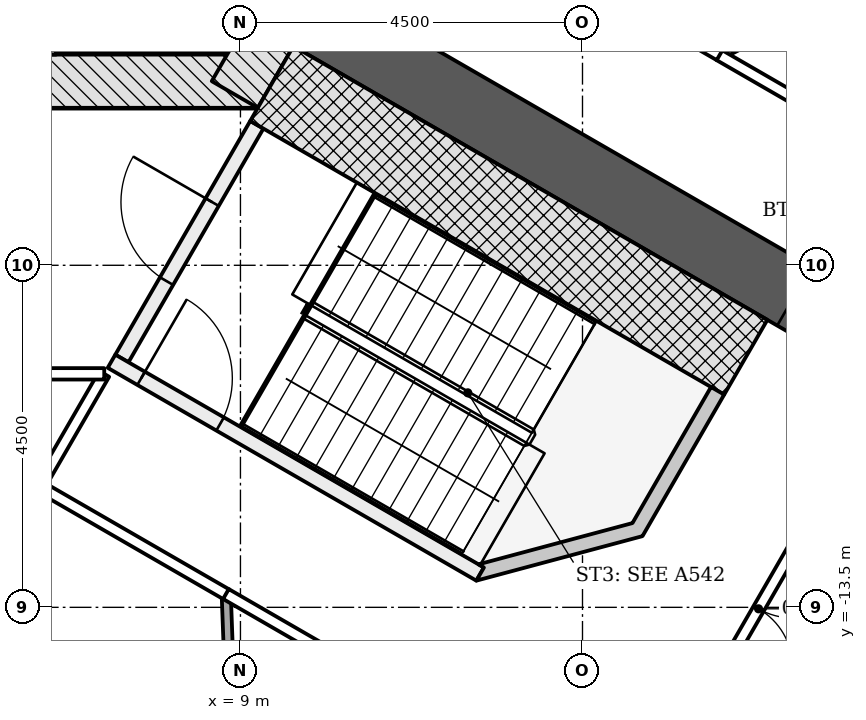
"""IFC4 building model, lengths in metres.
Left out: names, types, materials, properties, quantities, classifications, styles, units other than length and angle.
Written with IfcOpenShell. Run it as: python <this file> out.ifc"""

import sys

from ifc_helpers import new_model, si_unit, direction, frame, frame_2d, origin, place, context, subcontext, project, spatial, polyline, rectangle, outline, extrude, element, fill, save


model = new_model("IFC4")
c1 = context("Model", 3, precision=1e-05, world=origin(), true_north=direction((0.0, 1.0)))
c2 = subcontext(c1, "Body", "Model", "MODEL_VIEW")
j1 = project(units=[si_unit("LENGTHUNIT", "METRE"), si_unit("PLANEANGLEUNIT", "RADIAN")], contexts=[c1])
p1 = place(None, origin())
s1 = spatial("IfcSite", under=j1, at=p1, CompositionType="ELEMENT")
p2 = place(p1, origin())
s2 = spatial("IfcBuilding", under=s1, at=p2, CompositionType="ELEMENT")
p3 = place(p2, frame((0.0, 0.0, 19.5)))
s3 = spatial("IfcBuildingStorey", under=s2, at=p3, CompositionType="ELEMENT", Elevation=19.5)
p4 = place(p3, frame((-9.229, -6.578, -0.25), z_axis=(0.0, 0.0, 1.0), x_axis=(1.0, 0.0, 0.0)))
e1 = element("IfcWall", 1, at=p4, inside=s3, PredefinedType="SHEAR", context=c2, shape_type="SweptSolid", body=[
    extrude(rectangle(XDim=18.458, YDim=0.7, at=frame_2d((9.229, 0.0))), origin(), (0.0, 0.0, 1.0), 4.55),
])
p5 = place(p4, frame((3.304, 0.0, 0.25)))
e2 = element("IfcOpeningElement", 2, at=p5, cuts=e1, PredefinedType="OPENING", context=c2, shape_type="SweptSolid", body=[
    extrude(rectangle(XDim=1.1, YDim=2.1, at=frame_2d((0.55, 1.05))), frame((0.0, 0.36, 0.0), z_axis=(0.0, -1.0, 0.0), x_axis=(1.0, 0.0, 0.0)), (0.0, 0.0, 1.0), 0.72),
])
p6 = place(p4, frame((5.454, 0.0, 0.25)))
e3 = element("IfcOpeningElement", 3, at=p6, cuts=e1, PredefinedType="OPENING", context=c2, shape_type="SweptSolid", body=[
    extrude(rectangle(XDim=1.1, YDim=2.1, at=frame_2d((0.55, 1.05))), frame((0.0, 0.36, 0.0), z_axis=(0.0, -1.0, 0.0), x_axis=(1.0, 0.0, 0.0)), (0.0, 0.0, 1.0), 0.72),
])
p7 = place(p4, frame((7.604, 0.0, 0.25)))
e4 = element("IfcOpeningElement", 4, at=p7, cuts=e1, PredefinedType="OPENING", context=c2, shape_type="SweptSolid", body=[
    extrude(rectangle(XDim=1.1, YDim=2.1, at=frame_2d((0.55, 1.05))), frame((0.0, 0.36, 0.0), z_axis=(0.0, -1.0, 0.0), x_axis=(1.0, 0.0, 0.0)), (0.0, 0.0, 1.0), 0.72),
])
p8 = place(p4, frame((9.754, 0.0, 0.25)))
e5 = element("IfcOpeningElement", 5, at=p8, cuts=e1, PredefinedType="OPENING", context=c2, shape_type="SweptSolid", body=[
    extrude(rectangle(XDim=1.1, YDim=2.1, at=frame_2d((0.55, 1.05))), frame((0.0, 0.36, 0.0), z_axis=(0.0, -1.0, 0.0), x_axis=(1.0, 0.0, 0.0)), (0.0, 0.0, 1.0), 0.72),
])
p9 = place(p4, frame((11.904, 0.0, 0.25)))
e6 = element("IfcOpeningElement", 6, at=p9, cuts=e1, PredefinedType="OPENING", context=c2, shape_type="SweptSolid", body=[
    extrude(rectangle(XDim=1.1, YDim=2.1, at=frame_2d((0.55, 1.05))), frame((0.0, 0.36, 0.0), z_axis=(0.0, -1.0, 0.0), x_axis=(1.0, 0.0, 0.0)), (0.0, 0.0, 1.0), 0.72),
])
p10 = place(p4, frame((14.054, 0.0, 0.25)))
e7 = element("IfcOpeningElement", 7, at=p10, cuts=e1, PredefinedType="OPENING", context=c2, shape_type="SweptSolid", body=[
    extrude(rectangle(XDim=1.1, YDim=2.1, at=frame_2d((0.55, 1.05))), frame((0.0, 0.36, 0.0), z_axis=(0.0, -1.0, 0.0), x_axis=(1.0, 0.0, 0.0)), (0.0, 0.0, 1.0), 0.72),
])
p11 = place(p4, frame((1.079, 0.0, 0.25)))
e8 = element("IfcOpeningElement", 8, at=p11, cuts=e1, PredefinedType="OPENING", context=c2, shape_type="SweptSolid", body=[
    extrude(rectangle(XDim=0.9, YDim=2.1, at=frame_2d((0.45, 1.05))), frame((0.0, 0.36, 0.0), z_axis=(0.0, -1.0, 0.0), x_axis=(1.0, 0.0, 0.0)), (0.0, 0.0, 1.0), 0.72),
])
p12 = place(p3, frame((8.926, -6.753, -0.25), z_axis=(0.0, 0.0, 1.0), x_axis=(0.500042739161, 0.866000726912, 0.0)))
e9 = element("IfcWall", 9, at=p12, inside=s3, PredefinedType="SHEAR", context=c2, shape_type="SweptSolid", body=[
    extrude(rectangle(XDim=2.771, YDim=0.7, at=frame_2d((1.386, 0.0))), origin(), (0.0, 0.0, 1.0), 4.55),
])
p13 = place(p3, frame((9.922, -5.728, -0.25), z_axis=(0.0, 0.0, 1.0), x_axis=(0.866028046028, -0.499995423472, 0.0)))
e10 = element("IfcWall", 10, at=p13, inside=s3, PredefinedType="SHEAR", context=c2, shape_type="SweptSolid", body=[
    extrude(rectangle(XDim=14.633, YDim=0.9, at=frame_2d((7.316, 0.0))), origin(), (0.0, 0.0, 1.0), 4.55),
])
p14 = place(p13, frame((7.35, 0.0, 0.25)))
e11 = element("IfcOpeningElement", 11, at=p14, cuts=e10, PredefinedType="OPENING", context=c2, shape_type="SweptSolid", body=[
    extrude(rectangle(XDim=1.5, YDim=2.1, at=frame_2d((0.75, 1.05))), frame((0.0, 0.46, 0.0), z_axis=(0.0, -1.0, 0.0), x_axis=(1.0, 0.0, 0.0)), (0.0, 0.0, 1.0), 0.92),
])
p15 = place(p3, frame((6.45, -6.228, -0.25), z_axis=(0.0, 0.0, 1.0), x_axis=(0.0, 1.0, 0.0)))
e12 = element("IfcWall", 12, at=p15, inside=s3, PredefinedType="PARTITIONING", context=c2, shape_type="SweptSolid", body=[
    extrude(rectangle(XDim=2.5, YDim=0.25, at=frame_2d((1.25, 0.0))), origin(), (0.0, 0.0, 1.0), 4.55),
])
p16 = place(p3, frame((7.44, -10.226, -0.25), z_axis=(0.0, 0.0, 1.0), x_axis=(0.500022077904, 0.866012656725, 0.0)))
e13 = element("IfcWall", 13, at=p16, inside=s3, PredefinedType="SHEAR", context=c2, shape_type="SweptSolid", body=[
    extrude(rectangle(XDim=3.55, YDim=0.2, at=frame_2d((1.775, 0.0))), origin(), (0.0, 0.0, 1.0), 4.55),
])
p17 = place(p16, frame((1.175, 0.0, 0.25)))
e14 = element("IfcOpeningElement", 14, at=p17, cuts=e13, PredefinedType="OPENING", context=c2, shape_type="SweptSolid", body=[
    extrude(rectangle(XDim=1.2, YDim=2.1, at=frame_2d((0.6, 1.05))), frame((0.0, 0.11, 0.0), z_axis=(0.0, -1.0, 0.0), x_axis=(1.0, 0.0, 0.0)), (0.0, 0.0, 1.0), 0.22),
])
p18 = place(p3, frame((7.304, -10.262, -0.25), z_axis=(0.0, 0.0, 1.0), x_axis=(0.866026594901, -0.49999793692, 0.0)))
e15 = element("IfcWall", 15, at=p18, inside=s3, PredefinedType="SHEAR", context=c2, shape_type="SweptSolid", body=[
    extrude(rectangle(XDim=5.6, YDim=0.2, at=frame_2d((2.8, 0.0))), origin(), (0.0, 0.0, 1.0), 4.55),
])
p19 = place(p18, frame((0.45, 0.0, 0.25)))
e16 = element("IfcOpeningElement", 16, at=p19, cuts=e15, PredefinedType="OPENING", context=c2, shape_type="SweptSolid", body=[
    extrude(rectangle(XDim=1.2, YDim=2.1, at=frame_2d((0.6, 1.05))), frame((0.0, 0.11, 0.0), z_axis=(0.0, -1.0, 0.0), x_axis=(1.0, 0.0, 0.0)), (0.0, 0.0, 1.0), 0.22),
])
p20 = place(p3, frame((9.413, -6.61, -0.25), z_axis=(0.0, 0.0, 1.0), x_axis=(0.866018442252, -0.500012057535, 0.0)))
e17 = element("IfcWall", 17, at=p20, inside=s3, PredefinedType="SHEAR", context=c2, shape_type="SweptSolid", body=[
    extrude(rectangle(XDim=7.2, YDim=1.136, at=frame_2d((3.6, 0.0))), origin(), (0.0, 0.0, 1.0), 4.55),
])
p21 = place(p3, frame((0.0, 0.0, -0.25)))
e18 = element("IfcWall", 18, at=p21, inside=s3, PredefinedType="SHEAR", context=c2, shape_type="SweptSolid", body=[
    extrude(outline(polyline([(12.104, -13.149), (14.289, -12.563), (15.364, -10.701), (15.191, -10.601), (14.157, -12.392), (12.132, -12.934), (12.204, -12.976), (12.204, -12.976), (12.204, -12.976), (12.204, -12.976), (12.204, -12.976), (12.204, -12.976), (12.204, -12.976), (12.204, -12.976), (12.204, -12.976), (12.204, -12.976), (12.204, -12.976), (12.204, -12.976), (12.204, -12.976), (12.204, -12.976), (12.204, -12.976), (12.204, -12.976), (12.204, -12.976), (12.104, -13.149)])), origin(), (0.0, 0.0, 1.0), 4.55),
])
p22 = place(p3, frame((17.491, -10.618, 0.0), z_axis=(0.0, 0.0, 1.0), x_axis=(-0.499969057507, -0.866043267704, 0.0)))
e19 = element("IfcWall", 19, at=p22, inside=s3, PredefinedType="PARTITIONING", context=c2, shape_type="SweptSolid", body=[
    extrude(rectangle(XDim=6.685, YDim=0.15, at=frame_2d((3.342, 0.0))), origin(), (0.0, 0.0, 1.0), 3.843),
])
p23 = place(p22, frame((2.45, 0.0, 0.0)))
e20 = element("IfcOpeningElement", 20, at=p23, cuts=e19, PredefinedType="OPENING", context=c2, shape_type="SweptSolid", body=[
    extrude(rectangle(XDim=1.8, YDim=2.1, at=frame_2d((0.9, 1.05))), frame((0.0, 0.085, 0.0), z_axis=(0.0, -1.0, 0.0), x_axis=(1.0, 0.0, 0.0)), (0.0, 0.0, 1.0), 0.17),
])
p24 = place(p3, frame((8.935, -16.627, 0.0), z_axis=(0.0, 0.0, 1.0), x_axis=(-0.036989770664, 0.999315644262, 0.0)))
e21 = element("IfcWall", 21, at=p24, inside=s3, PredefinedType="PARTITIONING", context=c2, shape_type="SweptSolid", body=[
    extrude(rectangle(XDim=3.3, YDim=0.12, at=frame_2d((1.65, 0.0))), origin(), (0.0, 0.0, 1.0), 3.843),
])
p25 = place(p3, frame((8.817, -13.33, 0.0), z_axis=(0.0, 0.0, 1.0), x_axis=(-0.865999736111, 0.50004445508, 0.0)))
e22 = element("IfcWall", 22, at=p25, inside=s3, PredefinedType="PARTITIONING", context=c2, shape_type="SweptSolid", body=[
    extrude(rectangle(XDim=2.844, YDim=0.15, at=frame_2d((1.422, 0.0))), origin(), (0.0, 0.0, 1.0), 3.843),
])
p26 = place(p3, frame((6.354, -11.906, 0.0), z_axis=(0.0, 0.0, 1.0), x_axis=(0.500539815233, 0.865713516913, 0.0)))
e23 = element("IfcWall", 23, at=p26, inside=s3, PredefinedType="PARTITIONING", context=c2, shape_type="SweptSolid", body=[
    extrude(rectangle(XDim=1.706, YDim=0.15, at=frame_2d((0.853, 0.0))), origin(), (0.0, 0.0, 1.0), 4.3),
])
p27 = place(p3, frame((7.208, -10.428, 0.0), z_axis=(0.0, 0.0, 1.0), x_axis=(-1.0, 0.0, 0.0)))
e24 = element("IfcWall", 24, at=p27, inside=s3, PredefinedType="PARTITIONING", context=c2, shape_type="SweptSolid", body=[
    extrude(rectangle(XDim=2.861, YDim=0.15, at=frame_2d((1.431, 0.0))), origin(), (0.0, 0.0, 1.0), 3.698),
])
p28 = place(p27, frame((0.95, 0.0, 0.0)))
e25 = element("IfcOpeningElement", 25, at=p28, cuts=e24, PredefinedType="OPENING", context=c2, shape_type="SweptSolid", body=[
    extrude(rectangle(XDim=1.0, YDim=2.1, at=frame_2d((0.5, 1.05))), frame((0.0, 0.085, 0.0), z_axis=(0.0, -1.0, 0.0), x_axis=(1.0, 0.0, 0.0)), (0.0, 0.0, 1.0), 0.17),
])
p29 = place(p3, frame((13.377, -15.963, 0.0), z_axis=(0.0, 0.0, 1.0), x_axis=(-0.865969754012, 0.500096375847, 0.0)))
e26 = element("IfcWall", 26, at=p29, inside=s3, PredefinedType="PARTITIONING", context=c2, shape_type="SweptSolid", body=[
    extrude(rectangle(XDim=5.275, YDim=0.15, at=frame_2d((2.637, 0.0))), origin(), (0.0, 0.0, 1.0), 3.843),
])
p30 = place(p29, frame((2.15, 0.0, 0.0)))
e27 = element("IfcOpeningElement", 27, at=p30, cuts=e26, PredefinedType="OPENING", context=c2, shape_type="SweptSolid", body=[
    extrude(rectangle(XDim=1.0, YDim=2.1, at=frame_2d((0.5, 1.05))), frame((0.0, 0.085, 0.0), z_axis=(0.0, -1.0, 0.0), x_axis=(1.0, 0.0, 0.0)), (0.0, 0.0, 1.0), 0.17),
])
p31 = place(p3, frame((21.401, -3.15, 0.0), z_axis=(0.0, 0.0, 1.0), x_axis=(-0.892483368892, -0.451080299117, 0.0)))
e28 = element("IfcWall", 28, at=p31, inside=s3, PredefinedType="PARTITIONING", context=c2, shape_type="SweptSolid", body=[
    extrude(rectangle(XDim=6.837, YDim=0.12, at=frame_2d((3.418, 0.0))), origin(), (0.0, 0.0, 1.0), 3.767),
])
p32 = place(p3, frame((15.296, -6.233, 0.0), z_axis=(0.0, 0.0, 1.0), x_axis=(0.866035577775, -0.499982377718, 0.0)))
e29 = element("IfcWall", 29, at=p32, inside=s3, PredefinedType="PARTITIONING", context=c2, shape_type="SweptSolid", body=[
    extrude(rectangle(XDim=4.093, YDim=0.15, at=frame_2d((2.046, 0.0))), origin(), (0.0, 0.0, 1.0), 3.767),
])
p33 = place(p32, frame((1.15, 0.0, 0.0)))
e30 = element("IfcOpeningElement", 30, at=p33, cuts=e29, PredefinedType="OPENING", context=c2, shape_type="SweptSolid", body=[
    extrude(rectangle(XDim=1.8, YDim=2.1, at=frame_2d((0.9, 1.05))), frame((0.0, 0.085, 0.0), z_axis=(0.0, -1.0, 0.0), x_axis=(1.0, 0.0, 0.0)), (0.0, 0.0, 1.0), 0.17),
])
p34 = place(p3, frame((14.078, -5.529, 0.0), z_axis=(0.0, 0.0, 1.0), x_axis=(0.866110865696, -0.499851946404, 0.0)))
e31 = element("IfcWall", 31, at=p34, inside=s3, PredefinedType="PARTITIONING", context=c2, shape_type="SweptSolid", body=[
    extrude(rectangle(XDim=1.415, YDim=0.15, at=frame_2d((0.707, 0.0))), origin(), (0.0, 0.0, 1.0), 3.767),
])
p35 = place(p17, origin())
e32 = element("IfcDoor", 32, at=p35, inside=s3, OperationType="SINGLE_SWING_RIGHT", PredefinedType="DOOR", context=c2, shape_type="SweptSolid", body=[
    extrude(rectangle(XDim=1.2, YDim=2.1, at=frame_2d((0.6, 1.05))), frame((0.0, 0.025, 0.0), z_axis=(0.0, -1.0, 0.0), x_axis=(1.0, 0.0, 0.0)), (0.0, 0.0, 1.0), 0.05),
])
fill(e14, e32)
p36 = place(p19, origin())
e33 = element("IfcDoor", 33, at=p36, inside=s3, OperationType="SINGLE_SWING_LEFT", PredefinedType="DOOR", context=c2, shape_type="SweptSolid", body=[
    extrude(rectangle(XDim=1.2, YDim=2.1, at=frame_2d((0.6, 1.05))), frame((0.0, 0.025, 0.0), z_axis=(0.0, -1.0, 0.0), x_axis=(1.0, 0.0, 0.0)), (0.0, 0.0, 1.0), 0.05),
])
fill(e16, e33)
p37 = place(p23, origin())
e34 = element("IfcDoor", 34, at=p37, inside=s3, OperationType="DOUBLE_DOOR_SINGLE_SWING", PredefinedType="DOOR", context=c2, shape_type="SweptSolid", body=[
    extrude(rectangle(XDim=1.8, YDim=2.1, at=frame_2d((0.9, 1.05))), frame((0.0, 0.025, 0.0), z_axis=(0.0, -1.0, 0.0), x_axis=(1.0, 0.0, 0.0)), (0.0, 0.0, 1.0), 0.05),
])
fill(e20, e34)
save(model, sys.argv[1])
